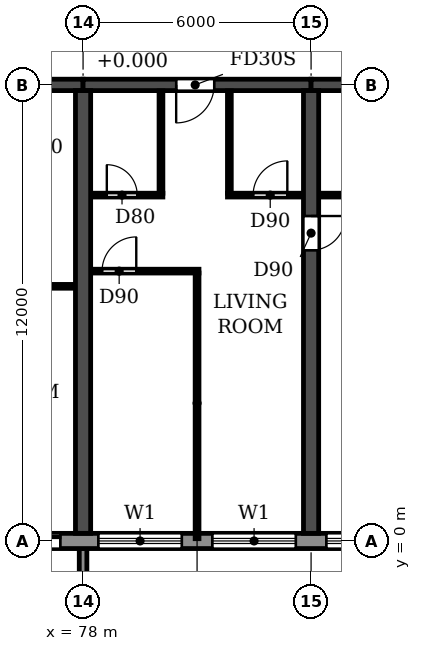
"""IFC4 building model, lengths in metres.
Left out: names, types, materials, properties, quantities, classifications, styles, units other than length and angle.
Written with IfcOpenShell. Run it as: python <this file> out.ifc"""

import sys

from ifc_helpers import new_model, si_unit, direction, frame, frame_2d, origin, place, context, subcontext, project, spatial, polyline, rectangle, outline, extrude, source, transform, mapped, element, fill, save


model = new_model("IFC4")
c1 = context("Model", 3, precision=1e-05, world=origin(), true_north=direction((0.0, 1.0)))
c2 = subcontext(c1, "Body", "Model", "MODEL_VIEW")
j1 = project(units=[si_unit("LENGTHUNIT", "METRE"), si_unit("PLANEANGLEUNIT", "RADIAN")], contexts=[c1])
p1 = place(None, origin())
s1 = spatial("IfcSite", under=j1, at=p1, CompositionType="ELEMENT")
p2 = place(p1, origin())
s2 = spatial("IfcBuilding", under=s1, at=p2, CompositionType="ELEMENT")
p3 = place(p2, frame((0.0, 0.0, 23.4)))
s3 = spatial("IfcBuildingStorey", under=s2, at=p3, CompositionType="ELEMENT", Elevation=23.4)
p4 = place(p3, frame((78.0, 0.2, 0.0), z_axis=(0.0, 0.0, 1.0), x_axis=(0.0, 1.0, 0.0)))
e1 = element("IfcWall", 1, at=p4, inside=s3, PredefinedType="SHEAR", context=c2, shape_type="SweptSolid", body=[
    extrude(rectangle(XDim=11.65, YDim=0.4, at=frame_2d((5.825, 0.0))), origin(), (0.0, 0.0, 1.0), 3.05),
])
p5 = place(p3, frame((84.0, 0.2, 0.0), z_axis=(0.0, 0.0, 1.0), x_axis=(0.0, 1.0, 0.0)))
e2 = element("IfcWall", 2, at=p5, inside=s3, PredefinedType="SHEAR", context=c2, shape_type="SweptSolid", body=[
    extrude(rectangle(XDim=11.65, YDim=0.4, at=frame_2d((5.825, 0.0))), origin(), (0.0, 0.0, 1.0), 3.05),
])
p6 = place(p5, frame((7.45, 0.0, 0.0)))
e3 = element("IfcOpeningElement", 3, at=p6, cuts=e2, PredefinedType="OPENING", context=c2, shape_type="SweptSolid", body=[
    extrude(rectangle(XDim=0.9, YDim=2.1, at=frame_2d((0.45, 1.05))), frame((0.0, 0.21, 0.0), z_axis=(0.0, -1.0, 0.0), x_axis=(1.0, 0.0, 0.0)), (0.0, 0.0, 1.0), 0.42),
])
p7 = place(p3, frame((72.0, 12.0, 0.0), z_axis=(0.0, 0.0, 1.0), x_axis=(1.0, 0.0, 0.0)))
e4 = element("IfcWall", 4, at=p7, inside=s3, PredefinedType="SHEAR", context=c2, shape_type="SweptSolid", body=[
    extrude(rectangle(XDim=6.0, YDim=0.3, at=frame_2d((3.0, 0.0))), origin(), (0.0, 0.0, 1.0), 2.45),
])
p8 = place(p7, frame((2.55, 0.0, 0.0)))
e5 = element("IfcOpeningElement", 5, at=p8, cuts=e4, PredefinedType="OPENING", context=c2, shape_type="SweptSolid", body=[
    extrude(rectangle(XDim=1.0, YDim=2.1, at=frame_2d((0.5, 1.05))), frame((0.0, 0.16, 0.0), z_axis=(0.0, -1.0, 0.0), x_axis=(1.0, 0.0, 0.0)), (0.0, 0.0, 1.0), 0.32),
])
p9 = place(p3, frame((78.0, 12.0, 0.0), z_axis=(0.0, 0.0, 1.0), x_axis=(1.0, 0.0, 0.0)))
e6 = element("IfcWall", 6, at=p9, inside=s3, PredefinedType="SHEAR", context=c2, shape_type="SweptSolid", body=[
    extrude(rectangle(XDim=6.0, YDim=0.3, at=frame_2d((3.0, 0.0))), origin(), (0.0, 0.0, 1.0), 2.45),
])
p10 = place(p9, frame((2.45, 0.0, 0.0)))
e7 = element("IfcOpeningElement", 7, at=p10, cuts=e6, PredefinedType="OPENING", context=c2, shape_type="SweptSolid", body=[
    extrude(rectangle(XDim=1.0, YDim=2.1, at=frame_2d((0.5, 1.05))), frame((0.0, 0.16, 0.0), z_axis=(0.0, -1.0, 0.0), x_axis=(1.0, 0.0, 0.0)), (0.0, 0.0, 1.0), 0.32),
])
p11 = place(p3, frame((84.0, 12.0, 0.0), z_axis=(0.0, 0.0, 1.0), x_axis=(1.0, 0.0, 0.0)))
e8 = element("IfcWall", 8, at=p11, inside=s3, PredefinedType="SHEAR", context=c2, shape_type="SweptSolid", body=[
    extrude(rectangle(XDim=6.0, YDim=0.3, at=frame_2d((3.0, 0.0))), origin(), (0.0, 0.0, 1.0), 2.45),
])
p12 = place(p3, frame((4.683, 0.0, 0.0), z_axis=(0.0, 0.0, 1.0), x_axis=(1.0, 0.0, 0.0)))
e9 = element("IfcWall", 9, at=p12, inside=s3, PredefinedType="STANDARD", context=c2, shape_type="SweptSolid", body=[
    extrude(rectangle(XDim=92.634, YDim=0.4, at=frame_2d((46.317, 0.0))), origin(), (0.0, 0.0, 1.0), 3.05),
])
p13 = place(p12, frame((1.717, 0.0, 0.9)))
e10 = element("IfcOpeningElement", 10, at=p13, cuts=e9, PredefinedType="OPENING", context=c2, shape_type="SweptSolid", body=[
    extrude(rectangle(XDim=2.2, YDim=1.5, at=frame_2d((1.1, 0.75))), frame((0.0, 0.21, 0.0), z_axis=(0.0, -1.0, 0.0), x_axis=(1.0, 0.0, 0.0)), (0.0, 0.0, 1.0), 0.42),
])
p14 = place(p12, frame((4.717, 0.0, 0.9)))
e11 = element("IfcOpeningElement", 11, at=p14, cuts=e9, PredefinedType="OPENING", context=c2, shape_type="SweptSolid", body=[
    extrude(rectangle(XDim=2.2, YDim=1.5, at=frame_2d((1.1, 0.75))), frame((0.0, 0.21, 0.0), z_axis=(0.0, -1.0, 0.0), x_axis=(1.0, 0.0, 0.0)), (0.0, 0.0, 1.0), 0.42),
])
p15 = place(p12, frame((7.717, 0.0, 0.9)))
e12 = element("IfcOpeningElement", 12, at=p15, cuts=e9, PredefinedType="OPENING", context=c2, shape_type="SweptSolid", body=[
    extrude(rectangle(XDim=2.2, YDim=1.5, at=frame_2d((1.1, 0.75))), frame((0.0, 0.21, 0.0), z_axis=(0.0, -1.0, 0.0), x_axis=(1.0, 0.0, 0.0)), (0.0, 0.0, 1.0), 0.42),
])
p16 = place(p12, frame((10.717, 0.0, 0.9)))
e13 = element("IfcOpeningElement", 13, at=p16, cuts=e9, PredefinedType="OPENING", context=c2, shape_type="SweptSolid", body=[
    extrude(rectangle(XDim=2.2, YDim=1.5, at=frame_2d((1.1, 0.75))), frame((0.0, 0.21, 0.0), z_axis=(0.0, -1.0, 0.0), x_axis=(1.0, 0.0, 0.0)), (0.0, 0.0, 1.0), 0.42),
])
p17 = place(p12, frame((13.717, 0.0, 0.9)))
e14 = element("IfcOpeningElement", 14, at=p17, cuts=e9, PredefinedType="OPENING", context=c2, shape_type="SweptSolid", body=[
    extrude(rectangle(XDim=2.2, YDim=1.5, at=frame_2d((1.1, 0.75))), frame((0.0, 0.21, 0.0), z_axis=(0.0, -1.0, 0.0), x_axis=(1.0, 0.0, 0.0)), (0.0, 0.0, 1.0), 0.42),
])
p18 = place(p12, frame((16.717, 0.0, 0.9)))
e15 = element("IfcOpeningElement", 15, at=p18, cuts=e9, PredefinedType="OPENING", context=c2, shape_type="SweptSolid", body=[
    extrude(rectangle(XDim=2.2, YDim=1.5, at=frame_2d((1.1, 0.75))), frame((0.0, 0.21, 0.0), z_axis=(0.0, -1.0, 0.0), x_axis=(1.0, 0.0, 0.0)), (0.0, 0.0, 1.0), 0.42),
])
p19 = place(p12, frame((19.917, 0.0, 0.0)))
e16 = element("IfcOpeningElement", 16, at=p19, cuts=e9, PredefinedType="OPENING", context=c2, shape_type="SweptSolid", body=[
    extrude(rectangle(XDim=1.8, YDim=2.4, at=frame_2d((0.9, 1.2))), frame((0.0, 0.21, 0.0), z_axis=(0.0, -1.0, 0.0), x_axis=(1.0, 0.0, 0.0)), (0.0, 0.0, 1.0), 0.42),
])
p20 = place(p12, frame((22.717, 0.0, 0.9)))
e17 = element("IfcOpeningElement", 17, at=p20, cuts=e9, PredefinedType="OPENING", context=c2, shape_type="SweptSolid", body=[
    extrude(rectangle(XDim=2.2, YDim=1.5, at=frame_2d((1.1, 0.75))), frame((0.0, 0.21, 0.0), z_axis=(0.0, -1.0, 0.0), x_axis=(1.0, 0.0, 0.0)), (0.0, 0.0, 1.0), 0.42),
])
p21 = place(p12, frame((25.717, 0.0, 0.9)))
e18 = element("IfcOpeningElement", 18, at=p21, cuts=e9, PredefinedType="OPENING", context=c2, shape_type="SweptSolid", body=[
    extrude(rectangle(XDim=2.2, YDim=1.5, at=frame_2d((1.1, 0.75))), frame((0.0, 0.21, 0.0), z_axis=(0.0, -1.0, 0.0), x_axis=(1.0, 0.0, 0.0)), (0.0, 0.0, 1.0), 0.42),
])
p22 = place(p12, frame((28.717, 0.0, 0.9)))
e19 = element("IfcOpeningElement", 19, at=p22, cuts=e9, PredefinedType="OPENING", context=c2, shape_type="SweptSolid", body=[
    extrude(rectangle(XDim=2.2, YDim=1.5, at=frame_2d((1.1, 0.75))), frame((0.0, 0.21, 0.0), z_axis=(0.0, -1.0, 0.0), x_axis=(1.0, 0.0, 0.0)), (0.0, 0.0, 1.0), 0.42),
])
p23 = place(p12, frame((31.917, 0.0, 0.0)))
e20 = element("IfcOpeningElement", 20, at=p23, cuts=e9, PredefinedType="OPENING", context=c2, shape_type="SweptSolid", body=[
    extrude(rectangle(XDim=1.8, YDim=2.4, at=frame_2d((0.9, 1.2))), frame((0.0, 0.21, 0.0), z_axis=(0.0, -1.0, 0.0), x_axis=(1.0, 0.0, 0.0)), (0.0, 0.0, 1.0), 0.42),
])
p24 = place(p12, frame((34.717, 0.0, 0.9)))
e21 = element("IfcOpeningElement", 21, at=p24, cuts=e9, PredefinedType="OPENING", context=c2, shape_type="SweptSolid", body=[
    extrude(rectangle(XDim=2.2, YDim=1.5, at=frame_2d((1.1, 0.75))), frame((0.0, 0.21, 0.0), z_axis=(0.0, -1.0, 0.0), x_axis=(1.0, 0.0, 0.0)), (0.0, 0.0, 1.0), 0.42),
])
p25 = place(p12, frame((37.717, 0.0, 0.9)))
e22 = element("IfcOpeningElement", 22, at=p25, cuts=e9, PredefinedType="OPENING", context=c2, shape_type="SweptSolid", body=[
    extrude(rectangle(XDim=2.2, YDim=1.5, at=frame_2d((1.1, 0.75))), frame((0.0, 0.21, 0.0), z_axis=(0.0, -1.0, 0.0), x_axis=(1.0, 0.0, 0.0)), (0.0, 0.0, 1.0), 0.42),
])
p26 = place(p12, frame((40.717, 0.0, 0.9)))
e23 = element("IfcOpeningElement", 23, at=p26, cuts=e9, PredefinedType="OPENING", context=c2, shape_type="SweptSolid", body=[
    extrude(rectangle(XDim=2.2, YDim=1.5, at=frame_2d((1.1, 0.75))), frame((0.0, 0.21, 0.0), z_axis=(0.0, -1.0, 0.0), x_axis=(1.0, 0.0, 0.0)), (0.0, 0.0, 1.0), 0.42),
])
p27 = place(p12, frame((43.917, 0.0, 0.0)))
e24 = element("IfcOpeningElement", 24, at=p27, cuts=e9, PredefinedType="OPENING", context=c2, shape_type="SweptSolid", body=[
    extrude(rectangle(XDim=1.8, YDim=2.4, at=frame_2d((0.9, 1.2))), frame((0.0, 0.21, 0.0), z_axis=(0.0, -1.0, 0.0), x_axis=(1.0, 0.0, 0.0)), (0.0, 0.0, 1.0), 0.42),
])
p28 = place(p12, frame((46.717, 0.0, 0.9)))
e25 = element("IfcOpeningElement", 25, at=p28, cuts=e9, PredefinedType="OPENING", context=c2, shape_type="SweptSolid", body=[
    extrude(rectangle(XDim=2.2, YDim=1.5, at=frame_2d((1.1, 0.75))), frame((0.0, 0.21, 0.0), z_axis=(0.0, -1.0, 0.0), x_axis=(1.0, 0.0, 0.0)), (0.0, 0.0, 1.0), 0.42),
])
p29 = place(p12, frame((49.717, 0.0, 0.9)))
e26 = element("IfcOpeningElement", 26, at=p29, cuts=e9, PredefinedType="OPENING", context=c2, shape_type="SweptSolid", body=[
    extrude(rectangle(XDim=2.2, YDim=1.5, at=frame_2d((1.1, 0.75))), frame((0.0, 0.21, 0.0), z_axis=(0.0, -1.0, 0.0), x_axis=(1.0, 0.0, 0.0)), (0.0, 0.0, 1.0), 0.42),
])
p30 = place(p12, frame((52.717, 0.0, 0.9)))
e27 = element("IfcOpeningElement", 27, at=p30, cuts=e9, PredefinedType="OPENING", context=c2, shape_type="SweptSolid", body=[
    extrude(rectangle(XDim=2.2, YDim=1.5, at=frame_2d((1.1, 0.75))), frame((0.0, 0.21, 0.0), z_axis=(0.0, -1.0, 0.0), x_axis=(1.0, 0.0, 0.0)), (0.0, 0.0, 1.0), 0.42),
])
p31 = place(p12, frame((55.717, 0.0, 0.9)))
e28 = element("IfcOpeningElement", 28, at=p31, cuts=e9, PredefinedType="OPENING", context=c2, shape_type="SweptSolid", body=[
    extrude(rectangle(XDim=2.2, YDim=1.5, at=frame_2d((1.1, 0.75))), frame((0.0, 0.21, 0.0), z_axis=(0.0, -1.0, 0.0), x_axis=(1.0, 0.0, 0.0)), (0.0, 0.0, 1.0), 0.42),
])
p32 = place(p12, frame((58.917, 0.0, 0.0)))
e29 = element("IfcOpeningElement", 29, at=p32, cuts=e9, PredefinedType="OPENING", context=c2, shape_type="SweptSolid", body=[
    extrude(rectangle(XDim=1.8, YDim=2.4, at=frame_2d((0.9, 1.2))), frame((0.0, 0.21, 0.0), z_axis=(0.0, -1.0, 0.0), x_axis=(1.0, 0.0, 0.0)), (0.0, 0.0, 1.0), 0.42),
])
p33 = place(p12, frame((61.717, 0.0, 0.9)))
e30 = element("IfcOpeningElement", 30, at=p33, cuts=e9, PredefinedType="OPENING", context=c2, shape_type="SweptSolid", body=[
    extrude(rectangle(XDim=2.2, YDim=1.5, at=frame_2d((1.1, 0.75))), frame((0.0, 0.21, 0.0), z_axis=(0.0, -1.0, 0.0), x_axis=(1.0, 0.0, 0.0)), (0.0, 0.0, 1.0), 0.42),
])
p34 = place(p12, frame((64.717, 0.0, 0.9)))
e31 = element("IfcOpeningElement", 31, at=p34, cuts=e9, PredefinedType="OPENING", context=c2, shape_type="SweptSolid", body=[
    extrude(rectangle(XDim=2.2, YDim=1.5, at=frame_2d((1.1, 0.75))), frame((0.0, 0.21, 0.0), z_axis=(0.0, -1.0, 0.0), x_axis=(1.0, 0.0, 0.0)), (0.0, 0.0, 1.0), 0.42),
])
p35 = place(p12, frame((67.717, 0.0, 0.9)))
e32 = element("IfcOpeningElement", 32, at=p35, cuts=e9, PredefinedType="OPENING", context=c2, shape_type="SweptSolid", body=[
    extrude(rectangle(XDim=2.2, YDim=1.5, at=frame_2d((1.1, 0.75))), frame((0.0, 0.21, 0.0), z_axis=(0.0, -1.0, 0.0), x_axis=(1.0, 0.0, 0.0)), (0.0, 0.0, 1.0), 0.42),
])
p36 = place(p12, frame((70.917, 0.0, 0.0)))
e33 = element("IfcOpeningElement", 33, at=p36, cuts=e9, PredefinedType="OPENING", context=c2, shape_type="SweptSolid", body=[
    extrude(rectangle(XDim=1.8, YDim=2.4, at=frame_2d((0.9, 1.2))), frame((0.0, 0.21, 0.0), z_axis=(0.0, -1.0, 0.0), x_axis=(1.0, 0.0, 0.0)), (0.0, 0.0, 1.0), 0.42),
])
p37 = place(p12, frame((73.717, 0.0, 0.9)))
e34 = element("IfcOpeningElement", 34, at=p37, cuts=e9, PredefinedType="OPENING", context=c2, shape_type="SweptSolid", body=[
    extrude(rectangle(XDim=2.2, YDim=1.5, at=frame_2d((1.1, 0.75))), frame((0.0, 0.21, 0.0), z_axis=(0.0, -1.0, 0.0), x_axis=(1.0, 0.0, 0.0)), (0.0, 0.0, 1.0), 0.42),
])
p38 = place(p12, frame((76.717, 0.0, 0.9)))
e35 = element("IfcOpeningElement", 35, at=p38, cuts=e9, PredefinedType="OPENING", context=c2, shape_type="SweptSolid", body=[
    extrude(rectangle(XDim=2.2, YDim=1.5, at=frame_2d((1.1, 0.75))), frame((0.0, 0.21, 0.0), z_axis=(0.0, -1.0, 0.0), x_axis=(1.0, 0.0, 0.0)), (0.0, 0.0, 1.0), 0.42),
])
p39 = place(p12, frame((79.717, 0.0, 0.9)))
e36 = element("IfcOpeningElement", 36, at=p39, cuts=e9, PredefinedType="OPENING", context=c2, shape_type="SweptSolid", body=[
    extrude(rectangle(XDim=2.2, YDim=1.5, at=frame_2d((1.1, 0.75))), frame((0.0, 0.21, 0.0), z_axis=(0.0, -1.0, 0.0), x_axis=(1.0, 0.0, 0.0)), (0.0, 0.0, 1.0), 0.42),
])
p40 = place(p12, frame((82.717, 0.0, 0.9)))
e37 = element("IfcOpeningElement", 37, at=p40, cuts=e9, PredefinedType="OPENING", context=c2, shape_type="SweptSolid", body=[
    extrude(rectangle(XDim=2.2, YDim=1.5, at=frame_2d((1.1, 0.75))), frame((0.0, 0.21, 0.0), z_axis=(0.0, -1.0, 0.0), x_axis=(1.0, 0.0, 0.0)), (0.0, 0.0, 1.0), 0.42),
])
p41 = place(p12, frame((85.717, 0.0, 0.9)))
e38 = element("IfcOpeningElement", 38, at=p41, cuts=e9, PredefinedType="OPENING", context=c2, shape_type="SweptSolid", body=[
    extrude(rectangle(XDim=2.2, YDim=1.5, at=frame_2d((1.1, 0.75))), frame((0.0, 0.21, 0.0), z_axis=(0.0, -1.0, 0.0), x_axis=(1.0, 0.0, 0.0)), (0.0, 0.0, 1.0), 0.42),
])
p42 = place(p12, frame((88.717, 0.0, 0.9)))
e39 = element("IfcOpeningElement", 39, at=p42, cuts=e9, PredefinedType="OPENING", context=c2, shape_type="SweptSolid", body=[
    extrude(rectangle(XDim=2.2, YDim=1.5, at=frame_2d((1.1, 0.75))), frame((0.0, 0.21, 0.0), z_axis=(0.0, -1.0, 0.0), x_axis=(1.0, 0.0, 0.0)), (0.0, 0.0, 1.0), 0.42),
])
m1 = source(origin(), c2, "Body", "SweptSolid", [
    extrude(outline(polyline([(0.0, 0.0), (0.2, 0.0), (0.2, 1.65), (0.0, 1.65), (0.0, 0.0)])), origin(), (0.0, 0.0, 1.0), 3.1),
])
p43 = place(p3, frame((77.9, -1.85, 0.0)))
e40 = element("IfcWall", 40, at=p43, inside=s3, PredefinedType="STANDARD", context=c2, shape_type="MappedRepresentation", body=[
    mapped(m1, transform((0.0, 0.0, 0.0))),
])
p44 = place(p3, frame((75.9, 6.7, 0.0), z_axis=(0.0, 0.0, 1.0), x_axis=(1.0, 0.0, 0.0)))
e41 = element("IfcWall", 41, at=p44, inside=s3, PredefinedType="PARTITIONING", context=c2, shape_type="SweptSolid", body=[
    extrude(rectangle(XDim=1.89, YDim=0.1, at=frame_2d((0.945, 0.0))), origin(), (0.0, 0.0, 1.0), 3.05),
])
p45 = place(p3, frame((78.21, 7.1, 0.0), z_axis=(0.0, 0.0, 1.0), x_axis=(1.0, 0.0, 0.0)))
e42 = element("IfcWall", 42, at=p45, inside=s3, PredefinedType="PARTITIONING", context=c2, shape_type="SweptSolid", body=[
    extrude(rectangle(XDim=2.84, YDim=0.1, at=frame_2d((1.42, 0.0))), origin(), (0.0, 0.0, 1.0), 3.05),
])
p46 = place(p45, frame((0.29, 0.0, 0.0)))
e43 = element("IfcOpeningElement", 43, at=p46, cuts=e42, PredefinedType="OPENING", context=c2, shape_type="SweptSolid", body=[
    extrude(rectangle(XDim=0.9, YDim=2.1, at=frame_2d((0.45, 1.05))), frame((0.0, 0.06, 0.0), z_axis=(0.0, -1.0, 0.0), x_axis=(1.0, 0.0, 0.0)), (0.0, 0.0, 1.0), 0.12),
])
p47 = place(p3, frame((78.21, 9.1, 0.0), z_axis=(0.0, 0.0, 1.0), x_axis=(1.0, 0.0, 0.0)))
e44 = element("IfcWall", 44, at=p47, inside=s3, PredefinedType="PARTITIONING", context=c2, shape_type="SweptSolid", body=[
    extrude(rectangle(XDim=1.89, YDim=0.1, at=frame_2d((0.945, 0.0))), origin(), (0.0, 0.0, 1.0), 3.05),
])
p48 = place(p47, frame((0.415, 0.0, 0.0)))
e45 = element("IfcOpeningElement", 45, at=p48, cuts=e44, PredefinedType="OPENING", context=c2, shape_type="SweptSolid", body=[
    extrude(rectangle(XDim=0.8, YDim=2.1, at=frame_2d((0.4, 1.05))), frame((0.0, 0.06, 0.0), z_axis=(0.0, -1.0, 0.0), x_axis=(1.0, 0.0, 0.0)), (0.0, 0.0, 1.0), 0.12),
])
p49 = place(p3, frame((81.8, 9.1, 0.0), z_axis=(0.0, 0.0, 1.0), x_axis=(1.0, 0.0, 0.0)))
e46 = element("IfcWall", 46, at=p49, inside=s3, PredefinedType="PARTITIONING", context=c2, shape_type="SweptSolid", body=[
    extrude(rectangle(XDim=1.99, YDim=0.1, at=frame_2d((0.995, 0.0))), origin(), (0.0, 0.0, 1.0), 3.05),
])
p50 = place(p49, frame((0.675, 0.0, 0.0)))
e47 = element("IfcOpeningElement", 47, at=p50, cuts=e46, PredefinedType="OPENING", context=c2, shape_type="SweptSolid", body=[
    extrude(rectangle(XDim=0.9, YDim=2.1, at=frame_2d((0.45, 1.05))), frame((0.0, 0.06, 0.0), z_axis=(0.0, -1.0, 0.0), x_axis=(1.0, 0.0, 0.0)), (0.0, 0.0, 1.0), 0.12),
])
p51 = place(p3, frame((84.21, 9.1, 0.0), z_axis=(0.0, 0.0, 1.0), x_axis=(1.0, 0.0, 0.0)))
e48 = element("IfcWall", 48, at=p51, inside=s3, PredefinedType="PARTITIONING", context=c2, shape_type="SweptSolid", body=[
    extrude(rectangle(XDim=2.69, YDim=0.1, at=frame_2d((1.345, 0.0))), origin(), (0.0, 0.0, 1.0), 3.05),
])
p52 = place(p51, frame((0.89, 0.0, 0.0)))
e49 = element("IfcOpeningElement", 49, at=p52, cuts=e48, PredefinedType="OPENING", context=c2, shape_type="SweptSolid", body=[
    extrude(rectangle(XDim=0.8, YDim=2.1, at=frame_2d((0.4, 1.05))), frame((0.0, 0.06, 0.0), z_axis=(0.0, -1.0, 0.0), x_axis=(1.0, 0.0, 0.0)), (0.0, 0.0, 1.0), 0.12),
])
p53 = place(p3, frame((80.05, 9.15, 0.0), z_axis=(0.0, 0.0, 1.0), x_axis=(0.0, 1.0, 0.0)))
e50 = element("IfcWall", 50, at=p53, inside=s3, PredefinedType="PARTITIONING", context=c2, shape_type="SweptSolid", body=[
    extrude(rectangle(XDim=2.69, YDim=0.1, at=frame_2d((1.345, 0.0))), origin(), (0.0, 0.0, 1.0), 3.05),
])
p54 = place(p3, frame((81.0, 0.06, 0.0), z_axis=(0.0, 0.0, 1.0), x_axis=(0.0, 1.0, 0.0)))
e51 = element("IfcWall", 51, at=p54, inside=s3, PredefinedType="PARTITIONING", context=c2, shape_type="SweptSolid", body=[
    extrude(rectangle(XDim=6.99, YDim=0.1, at=frame_2d((3.495, 0.0))), origin(), (0.0, 0.0, 1.0), 3.05),
])
p55 = place(p3, frame((81.85, 9.15, 0.0), z_axis=(0.0, 0.0, 1.0), x_axis=(0.0, 1.0, 0.0)))
e52 = element("IfcWall", 52, at=p55, inside=s3, PredefinedType="PARTITIONING", context=c2, shape_type="SweptSolid", body=[
    extrude(rectangle(XDim=2.69, YDim=0.1, at=frame_2d((1.345, 0.0))), origin(), (0.0, 0.0, 1.0), 3.05),
])
p56 = place(p36, origin())
e53 = element("IfcDoor", 53, at=p56, inside=s3, OperationType="DOUBLE_DOOR_SLIDING", PredefinedType="DOOR", context=c2, shape_type="SweptSolid", body=[
    extrude(rectangle(XDim=1.8, YDim=2.4, at=frame_2d((0.9, 1.2))), frame((0.0, 0.025, 0.0), z_axis=(0.0, -1.0, 0.0), x_axis=(1.0, 0.0, 0.0)), (0.0, 0.0, 1.0), 0.05),
])
fill(e33, e53)
p57 = place(p37, origin())
e54 = element("IfcWindow", 54, at=p57, inside=s3, PartitioningType="DOUBLE_PANEL_HORIZONTAL", PredefinedType="WINDOW", context=c2, shape_type="SweptSolid", body=[
    extrude(rectangle(XDim=2.2, YDim=1.5, at=frame_2d((1.1, 0.75))), frame((0.0, 0.03, 0.0), z_axis=(0.0, -1.0, 0.0), x_axis=(1.0, 0.0, 0.0)), (0.0, 0.0, 1.0), 0.06),
])
fill(e34, e54)
p58 = place(p38, origin())
e55 = element("IfcWindow", 55, at=p58, inside=s3, PartitioningType="DOUBLE_PANEL_HORIZONTAL", PredefinedType="WINDOW", context=c2, shape_type="SweptSolid", body=[
    extrude(rectangle(XDim=2.2, YDim=1.5, at=frame_2d((1.1, 0.75))), frame((0.0, 0.03, 0.0), z_axis=(0.0, -1.0, 0.0), x_axis=(1.0, 0.0, 0.0)), (0.0, 0.0, 1.0), 0.06),
])
fill(e35, e55)
p59 = place(p39, origin())
e56 = element("IfcWindow", 56, at=p59, inside=s3, PartitioningType="DOUBLE_PANEL_HORIZONTAL", PredefinedType="WINDOW", context=c2, shape_type="SweptSolid", body=[
    extrude(rectangle(XDim=2.2, YDim=1.5, at=frame_2d((1.1, 0.75))), frame((0.0, 0.03, 0.0), z_axis=(0.0, -1.0, 0.0), x_axis=(1.0, 0.0, 0.0)), (0.0, 0.0, 1.0), 0.06),
])
fill(e36, e56)
p60 = place(p46, origin())
e57 = element("IfcDoor", 57, at=p60, inside=s3, OperationType="SINGLE_SWING_RIGHT", PredefinedType="DOOR", context=c2, shape_type="SweptSolid", body=[
    extrude(rectangle(XDim=0.9, YDim=2.1, at=frame_2d((0.45, 1.05))), frame((0.0, 0.025, 0.0), z_axis=(0.0, -1.0, 0.0), x_axis=(1.0, 0.0, 0.0)), (0.0, 0.0, 1.0), 0.05),
])
fill(e43, e57)
p61 = place(p48, origin())
e58 = element("IfcDoor", 58, at=p61, inside=s3, OperationType="SINGLE_SWING_LEFT", PredefinedType="DOOR", context=c2, shape_type="SweptSolid", body=[
    extrude(rectangle(XDim=0.8, YDim=2.1, at=frame_2d((0.4, 1.05))), frame((0.0, 0.025, 0.0), z_axis=(0.0, -1.0, 0.0), x_axis=(1.0, 0.0, 0.0)), (0.0, 0.0, 1.0), 0.05),
])
fill(e45, e58)
p62 = place(p10, frame((1.0, 0.0, 0.0), z_axis=(0.0, 0.0, 1.0), x_axis=(-1.0, 0.0, 0.0)))
e59 = element("IfcDoor", 59, at=p62, inside=s3, OperationType="SINGLE_SWING_RIGHT", PredefinedType="DOOR", context=c2, shape_type="SweptSolid", body=[
    extrude(rectangle(XDim=1.0, YDim=2.1, at=frame_2d((0.5, 1.05))), frame((0.0, 0.025, 0.0), z_axis=(0.0, -1.0, 0.0), x_axis=(1.0, 0.0, 0.0)), (0.0, 0.0, 1.0), 0.05),
])
fill(e7, e59)
p63 = place(p50, origin())
e60 = element("IfcDoor", 60, at=p63, inside=s3, OperationType="SINGLE_SWING_RIGHT", PredefinedType="DOOR", context=c2, shape_type="SweptSolid", body=[
    extrude(rectangle(XDim=0.9, YDim=2.1, at=frame_2d((0.45, 1.05))), frame((0.0, 0.025, 0.0), z_axis=(0.0, -1.0, 0.0), x_axis=(1.0, 0.0, 0.0)), (0.0, 0.0, 1.0), 0.05),
])
fill(e47, e60)
p64 = place(p6, frame((0.9, 0.0, 0.0), z_axis=(0.0, 0.0, 1.0), x_axis=(-1.0, 0.0, 0.0)))
e61 = element("IfcDoor", 61, at=p64, inside=s3, OperationType="SINGLE_SWING_LEFT", PredefinedType="DOOR", context=c2, shape_type="SweptSolid", body=[
    extrude(rectangle(XDim=0.9, YDim=2.1, at=frame_2d((0.45, 1.05))), frame((0.0, 0.025, 0.0), z_axis=(0.0, -1.0, 0.0), x_axis=(1.0, 0.0, 0.0)), (0.0, 0.0, 1.0), 0.05),
])
fill(e3, e61)
save(model, sys.argv[1])
